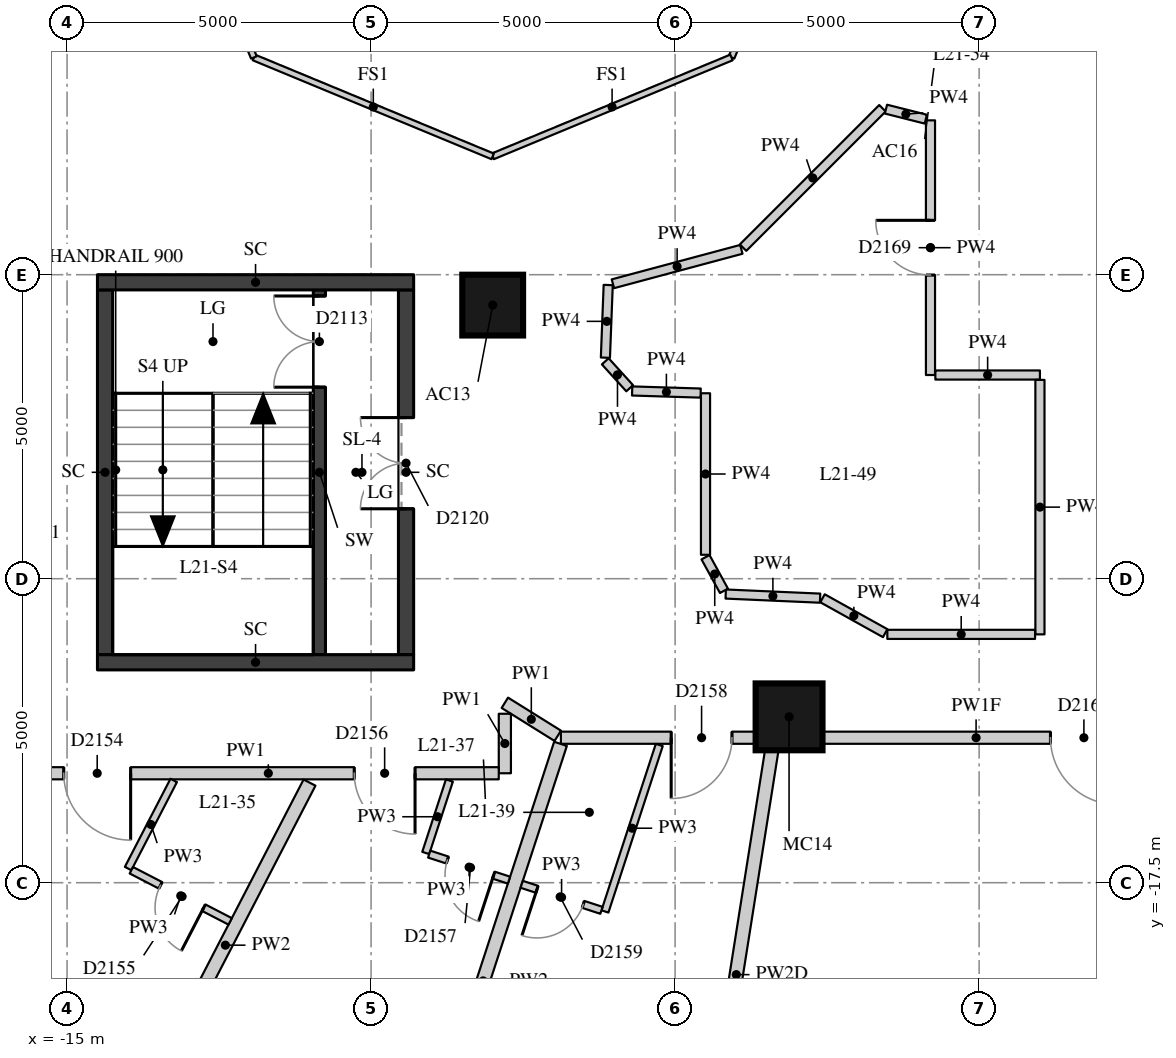
"""IFC4 building model, lengths in metres.
Left out: names, types, materials, properties, quantities, classifications, styles, units other than length and angle.
Written with IfcOpenShell. Run it as: python <this file> out.ifc"""

import sys

from ifc_helpers import new_model, si_unit, direction, frame, frame_2d, origin, origin_2d, place, context, subcontext, project, spatial, rectangle, extrude, element, fill, save


model = new_model("IFC4")
c1 = context("Model", 3, precision=1e-05, world=origin(), true_north=direction((0.0, 1.0)))
c2 = subcontext(c1, "Body", "Model", "MODEL_VIEW")
j1 = project(units=[si_unit("LENGTHUNIT", "METRE"), si_unit("PLANEANGLEUNIT", "RADIAN")], contexts=[c1])
p1 = place(None, origin())
s1 = spatial("IfcSite", under=j1, at=p1, CompositionType="ELEMENT")
p2 = place(p1, origin())
s2 = spatial("IfcBuilding", under=s1, at=p2, CompositionType="ELEMENT")
p3 = place(p2, frame((0.0, 0.0, 77.8)))
s3 = spatial("IfcBuildingStorey", under=s2, at=p3, CompositionType="ELEMENT", Elevation=77.8)
p4 = place(p3, frame((-8.0, -8.0, 0.0), z_axis=(0.0, 0.0, 1.0), x_axis=(1.0, 0.0, 0.0)))
e1 = element("IfcColumn", 1, at=p4, inside=s3, PredefinedType="COLUMN", context=c2, shape_type="SweptSolid", body=[
    extrude(rectangle(XDim=1.0, YDim=1.0, at=origin_2d()), origin(), (0.0, 0.0, 1.0), 3.3),
])
p5 = place(p3, frame((-3.126, -14.772, 0.0), z_axis=(0.0, 0.0, 1.0), x_axis=(1.0, 0.0, 0.0)))
e2 = element("IfcColumn", 2, at=p5, inside=s3, PredefinedType="COLUMN", context=c2, shape_type="SweptSolid", body=[
    extrude(rectangle(XDim=1.1, YDim=1.1, at=origin_2d()), origin(), (0.0, 0.0, 1.0), 3.3),
])
p6 = place(p3, frame((-10.85, -13.75, 0.0), z_axis=(0.0, 0.0, 1.0), x_axis=(0.0, 1.0, 0.0)))
e3 = element("IfcWall", 3, at=p6, inside=s3, PredefinedType="SHEAR", context=c2, shape_type="SweptSolid", body=[
    extrude(rectangle(XDim=6.0, YDim=0.2, at=frame_2d((3.0, 0.0))), origin(), (0.0, 0.0, 1.0), 3.02),
])
p7 = place(p6, frame((4.4, 0.0, 0.0)))
e4 = element("IfcOpeningElement", 4, at=p7, cuts=e3, PredefinedType="OPENING", context=c2, shape_type="SweptSolid", body=[
    extrude(rectangle(XDim=1.5, YDim=2.1, at=frame_2d((0.75, 1.05))), frame((0.0, 0.11, 0.0), z_axis=(0.0, -1.0, 0.0), x_axis=(1.0, 0.0, 0.0)), (0.0, 0.0, 1.0), 0.22),
])
p8 = place(p3, frame((-14.375, -13.75, -0.28), z_axis=(0.0, 0.0, 1.0), x_axis=(0.0, 1.0, 0.0)))
e5 = element("IfcWall", 5, at=p8, inside=s3, PredefinedType="SHEAR", context=c2, shape_type="SweptSolid", body=[
    extrude(rectangle(XDim=6.0, YDim=0.25, at=frame_2d((3.0, 0.0))), origin(), (0.0, 0.0, 1.0), 3.3),
])
p9 = place(p3, frame((-9.425, -13.75, -0.28), z_axis=(0.0, 0.0, 1.0), x_axis=(0.0, 1.0, 0.0)))
e6 = element("IfcWall", 6, at=p9, inside=s3, PredefinedType="SHEAR", context=c2, shape_type="SweptSolid", body=[
    extrude(rectangle(XDim=6.0, YDim=0.25, at=frame_2d((3.0, 0.0))), origin(), (0.0, 0.0, 1.0), 3.3),
])
p10 = place(p9, frame((2.4, 0.0, 0.28)))
e7 = element("IfcOpeningElement", 7, at=p10, cuts=e6, PredefinedType="OPENING", context=c2, shape_type="SweptSolid", body=[
    extrude(rectangle(XDim=1.5, YDim=2.1, at=frame_2d((0.75, 1.05))), frame((0.0, 0.135, 0.0), z_axis=(0.0, -1.0, 0.0), x_axis=(1.0, 0.0, 0.0)), (0.0, 0.0, 1.0), 0.27),
])
for number, where, z_axis, x_axis in (
    (8, (-14.5, -7.625, -0.28), (0.0, 0.0, 1.0), (1.0, 0.0, 0.0)),
    (9, (-14.5, -13.875, -0.28), (0.0, 0.0, 1.0), (1.0, 0.0, 0.0)),
):
    element("IfcWall", number, at=place(p3, frame(where, z_axis=z_axis, x_axis=x_axis)), inside=s3, PredefinedType="SHEAR", context=c2, shape_type="SweptSolid", body=[
        extrude(rectangle(XDim=5.2, YDim=0.25, at=frame_2d((2.6, 0.0))), origin(), (0.0, 0.0, 1.0), 3.3),
    ])
p11 = place(p3, frame((6.778, -15.115, 0.0), z_axis=(0.0, 0.0, 1.0), x_axis=(-1.0, 0.0, 0.0)))
e10 = element("IfcWall", 10, at=p11, inside=s3, PredefinedType="PARTITIONING", context=c2, shape_type="SweptSolid", body=[
    extrude(rectangle(XDim=13.657, YDim=0.2, at=frame_2d((6.828, 0.0))), origin(), (0.0, 0.0, 1.0), 2.42),
])
p12 = place(p11, frame((10.843, 0.0, 0.0)))
e11 = element("IfcOpeningElement", 11, at=p12, cuts=e10, PredefinedType="OPENING", context=c2, shape_type="SweptSolid", body=[
    extrude(rectangle(XDim=1.0, YDim=2.1, at=frame_2d((0.5, 1.05))), frame((0.0, 0.11, 0.0), z_axis=(0.0, -1.0, 0.0), x_axis=(1.0, 0.0, 0.0)), (0.0, 0.0, 1.0), 0.22),
])
p13 = place(p11, frame((4.505, 0.0, 0.0)))
e12 = element("IfcOpeningElement", 12, at=p13, cuts=e10, PredefinedType="OPENING", context=c2, shape_type="SweptSolid", body=[
    extrude(rectangle(XDim=1.1, YDim=2.1, at=frame_2d((0.55, 1.05))), frame((0.0, 0.11, 0.0), z_axis=(0.0, -1.0, 0.0), x_axis=(1.0, 0.0, 0.0)), (0.0, 0.0, 1.0), 0.22),
])
p14 = place(p3, frame((-6.93, -15.084, 0.0), z_axis=(0.0, 0.0, 1.0), x_axis=(-0.848439230109, 0.529292804421, 0.0)))
e13 = element("IfcWall", 13, at=p14, inside=s3, PredefinedType="PARTITIONING", context=c2, shape_type="SweptSolid", body=[
    extrude(rectangle(XDim=1.026, YDim=0.2, at=frame_2d((0.513, 0.0))), origin(), (0.0, 0.0, 1.0), 3.02),
])
p15 = place(p3, frame((-7.8, -14.721, 0.0), z_axis=(0.0, 0.0, 1.0), x_axis=(0.0, -1.0, 0.0)))
e14 = element("IfcWall", 14, at=p15, inside=s3, PredefinedType="PARTITIONING", context=c2, shape_type="SweptSolid", body=[
    extrude(rectangle(XDim=0.979, YDim=0.2, at=frame_2d((0.489, 0.0))), origin(), (0.0, 0.0, 1.0), 3.02),
])
p16 = place(p3, frame((-7.9, -15.7, 0.0), z_axis=(0.0, 0.0, 1.0), x_axis=(-1.0, 0.0, 0.0)))
e15 = element("IfcWall", 15, at=p16, inside=s3, PredefinedType="PARTITIONING", context=c2, shape_type="SweptSolid", body=[
    extrude(rectangle(XDim=7.58, YDim=0.2, at=frame_2d((3.79, 0.0))), origin(), (0.0, 0.0, 1.0), 3.02),
])
p17 = place(p16, frame((6.054, 0.0, 0.0)))
e16 = element("IfcOpeningElement", 16, at=p17, cuts=e15, PredefinedType="OPENING", context=c2, shape_type="SweptSolid", body=[
    extrude(rectangle(XDim=1.1, YDim=2.1, at=frame_2d((0.55, 1.05))), frame((0.0, 0.11, 0.0), z_axis=(0.0, -1.0, 0.0), x_axis=(1.0, 0.0, 0.0)), (0.0, 0.0, 1.0), 0.22),
])
p18 = place(p16, frame((1.377, 0.0, 0.0)))
e17 = element("IfcOpeningElement", 17, at=p18, cuts=e15, PredefinedType="OPENING", context=c2, shape_type="SweptSolid", body=[
    extrude(rectangle(XDim=1.0, YDim=2.1, at=frame_2d((0.5, 1.05))), frame((0.0, 0.11, 0.0), z_axis=(0.0, -1.0, 0.0), x_axis=(1.0, 0.0, 0.0)), (0.0, 0.0, 1.0), 0.22),
])
p19 = place(p3, frame((-0.8, -4.961, 0.0), z_axis=(0.0, 0.0, 1.0), x_axis=(0.0, -1.0, 0.0)))
e18 = element("IfcWall", 18, at=p19, inside=s3, PredefinedType="PARTITIONING", context=c2, shape_type="SweptSolid", body=[
    extrude(rectangle(XDim=4.188, YDim=0.15, at=frame_2d((2.094, 0.0))), origin(), (0.0, 0.0, 1.0), 3.02),
])
p20 = place(p19, frame((1.644, 0.0, 0.0)))
e19 = element("IfcOpeningElement", 19, at=p20, cuts=e18, PredefinedType="OPENING", context=c2, shape_type="SweptSolid", body=[
    extrude(rectangle(XDim=0.9, YDim=2.1, at=frame_2d((0.45, 1.05))), frame((0.0, 0.085, 0.0), z_axis=(0.0, -1.0, 0.0), x_axis=(1.0, 0.0, 0.0)), (0.0, 0.0, 1.0), 0.17),
])
p21 = place(p3, frame((-0.72, -9.15, 0.0), z_axis=(0.0, 0.0, 1.0), x_axis=(1.0, 0.0, 0.0)))
e20 = element("IfcWall", 20, at=p21, inside=s3, PredefinedType="PARTITIONING", context=c2, shape_type="SweptSolid", body=[
    extrude(rectangle(XDim=1.72, YDim=0.15, at=frame_2d((0.86, 0.0))), origin(), (0.0, 0.0, 1.0), 3.02),
])
p22 = place(p3, frame((1.0, -9.23, 0.0), z_axis=(0.0, 0.0, 1.0), x_axis=(0.0, -1.0, 0.0)))
e21 = element("IfcWall", 21, at=p22, inside=s3, PredefinedType="PARTITIONING", context=c2, shape_type="SweptSolid", body=[
    extrude(rectangle(XDim=4.186, YDim=0.15, at=frame_2d((2.093, 0.0))), origin(), (0.0, 0.0, 1.0), 3.02),
])
p23 = place(p3, frame((0.92, -13.416, 0.0), z_axis=(0.0, 0.0, 1.0), x_axis=(-1.0, 0.0, 0.0)))
e22 = element("IfcWall", 22, at=p23, inside=s3, PredefinedType="PARTITIONING", context=c2, shape_type="SweptSolid", body=[
    extrude(rectangle(XDim=2.43, YDim=0.15, at=frame_2d((1.215, 0.0))), origin(), (0.0, 0.0, 1.0), 3.02),
])
p24 = place(p3, frame((-1.545, -13.396, 0.0), z_axis=(0.0, 0.0, 1.0), x_axis=(-0.873678559566, 0.486503622345, 0.0)))
e23 = element("IfcWall", 23, at=p24, inside=s3, PredefinedType="PARTITIONING", context=c2, shape_type="SweptSolid", body=[
    extrude(rectangle(XDim=1.18, YDim=0.15, at=frame_2d((0.59, 0.0))), origin(), (0.0, 0.0, 1.0), 3.02),
])
p25 = place(p3, frame((-2.616, -12.82, 0.0), z_axis=(0.0, 0.0, 1.0), x_axis=(-0.99904515517, 0.04368956318, 0.0)))
e24 = element("IfcWall", 24, at=p25, inside=s3, PredefinedType="PARTITIONING", context=c2, shape_type="SweptSolid", body=[
    extrude(rectangle(XDim=1.553, YDim=0.15, at=frame_2d((0.777, 0.0))), origin(), (0.0, 0.0, 1.0), 3.02),
])
p26 = place(p3, frame((-4.196, -12.699, 0.0), z_axis=(0.0, 0.0, 1.0), x_axis=(-0.481398734925, 0.876501715921, 0.0)))
e25 = element("IfcWall", 25, at=p26, inside=s3, PredefinedType="PARTITIONING", context=c2, shape_type="SweptSolid", body=[
    extrude(rectangle(XDim=0.631, YDim=0.15, at=frame_2d((0.315, 0.0))), origin(), (0.0, 0.0, 1.0), 3.02),
])
p27 = place(p3, frame((-4.5, -12.106, 0.0), z_axis=(0.0, 0.0, 1.0), x_axis=(0.0, 1.0, 0.0)))
e26 = element("IfcWall", 26, at=p27, inside=s3, PredefinedType="PARTITIONING", context=c2, shape_type="SweptSolid", body=[
    extrude(rectangle(XDim=2.656, YDim=0.15, at=frame_2d((1.328, 0.0))), origin(), (0.0, 0.0, 1.0), 3.02),
])
p28 = place(p3, frame((-4.58, -9.447, 0.0), z_axis=(0.0, 0.0, 1.0), x_axis=(-0.999526758156, 0.030761334993, 0.0)))
e27 = element("IfcWall", 27, at=p28, inside=s3, PredefinedType="PARTITIONING", context=c2, shape_type="SweptSolid", body=[
    extrude(rectangle(XDim=1.127, YDim=0.15, at=frame_2d((0.563, 0.0))), origin(), (0.0, 0.0, 1.0), 3.02),
])
p29 = place(p3, frame((-5.747, -9.368, 0.0), z_axis=(0.0, 0.0, 1.0), x_axis=(-0.671757620202, 0.740771017049, 0.0)))
e28 = element("IfcWall", 28, at=p29, inside=s3, PredefinedType="PARTITIONING", context=c2, shape_type="SweptSolid", body=[
    extrude(rectangle(XDim=0.598, YDim=0.15, at=frame_2d((0.299, 0.0))), origin(), (0.0, 0.0, 1.0), 3.02),
])
p30 = place(p3, frame((-6.146, -8.865, 0.0), z_axis=(0.0, 0.0, 1.0), x_axis=(0.038582079081, 0.999255434398, 0.0)))
e29 = element("IfcWall", 29, at=p30, inside=s3, PredefinedType="PARTITIONING", context=c2, shape_type="SweptSolid", body=[
    extrude(rectangle(XDim=1.196, YDim=0.15, at=frame_2d((0.598, 0.0))), origin(), (0.0, 0.0, 1.0), 3.02),
])
p31 = place(p3, frame((-6.023, -7.649, 0.0), z_axis=(0.0, 0.0, 1.0), x_axis=(0.965906186456, 0.258892330836, 0.0)))
e30 = element("IfcWall", 30, at=p31, inside=s3, PredefinedType="PARTITIONING", context=c2, shape_type="SweptSolid", body=[
    extrude(rectangle(XDim=2.187, YDim=0.15, at=frame_2d((1.093, 0.0))), origin(), (0.0, 0.0, 1.0), 3.02),
])
p32 = place(p3, frame((-3.882, -7.055, 0.0), z_axis=(0.0, 0.0, 1.0), x_axis=(0.707069126061, 0.707144434307, 0.0)))
e31 = element("IfcWall", 31, at=p32, inside=s3, PredefinedType="PARTITIONING", context=c2, shape_type="SweptSolid", body=[
    extrude(rectangle(XDim=3.242, YDim=0.15, at=frame_2d((1.621, 0.0))), origin(), (0.0, 0.0, 1.0), 3.02),
])
p33 = place(p3, frame((-1.532, -4.777, 0.0), z_axis=(0.0, 0.0, 1.0), x_axis=(0.969694394352, -0.244321062461, 0.0)))
e32 = element("IfcWall", 32, at=p33, inside=s3, PredefinedType="PARTITIONING", context=c2, shape_type="SweptSolid", body=[
    extrude(rectangle(XDim=0.676, YDim=0.15, at=frame_2d((0.338, 0.0))), origin(), (0.0, 0.0, 1.0), 3.02),
])
p34 = place(p3, frame((-13.78, -21.201, 0.0), z_axis=(0.0, 0.0, 1.0), x_axis=(0.459689820266, 0.888079539875, 0.0)))
e33 = element("IfcWall", 33, at=p34, inside=s3, PredefinedType="PARTITIONING", context=c2, shape_type="SweptSolid", body=[
    extrude(rectangle(XDim=6.021, YDim=0.22, at=frame_2d((3.011, 0.0))), origin(), (0.0, 0.0, 1.0), 3.02),
])
p35 = place(p3, frame((-9.429, -23.014, 0.0), z_axis=(0.0, 0.0, 1.0), x_axis=(0.310248090606, 0.950655627594, 0.0)))
e34 = element("IfcWall", 34, at=p35, inside=s3, PredefinedType="PARTITIONING", context=c2, shape_type="SweptSolid", body=[
    extrude(rectangle(XDim=8.203, YDim=0.22, at=frame_2d((4.102, 0.0))), origin(), (0.0, 0.0, 1.0), 3.02),
])
p36 = place(p3, frame((-4.591, -22.789, 0.0), z_axis=(0.0, 0.0, 1.0), x_axis=(0.156151107863, 0.987733178299, 0.0)))
e35 = element("IfcWall", 35, at=p36, inside=s3, PredefinedType="PARTITIONING", context=c2, shape_type="SweptSolid", body=[
    extrude(rectangle(XDim=7.647, YDim=0.22, at=frame_2d((3.823, 0.0))), origin(), (0.0, 0.0, 1.0), 2.47),
])
p37 = place(p3, frame((-13.246, -15.818, 0.0), z_axis=(0.0, 0.0, 1.0), x_axis=(-0.459675202516, -0.888087106196, 0.0)))
e36 = element("IfcWall", 36, at=p37, inside=s3, PredefinedType="PARTITIONING", context=c2, shape_type="SweptSolid", body=[
    extrude(rectangle(XDim=1.632, YDim=0.12, at=frame_2d((0.816, 0.0))), origin(), (0.0, 0.0, 1.0), 3.02),
])
p38 = place(p3, frame((-8.712, -15.819, 0.0), z_axis=(0.0, 0.0, 1.0), x_axis=(-0.310322794195, -0.950631244702, 0.0)))
e37 = element("IfcWall", 37, at=p38, inside=s3, PredefinedType="PARTITIONING", context=c2, shape_type="SweptSolid", body=[
    extrude(rectangle(XDim=1.254, YDim=0.12, at=frame_2d((0.627, 0.0))), origin(), (0.0, 0.0, 1.0), 3.02),
])
p39 = place(p3, frame((-5.26, -15.235, 0.0), z_axis=(0.0, 0.0, 1.0), x_axis=(-0.310220453498, -0.950664646567, 0.0)))
e38 = element("IfcWall", 38, at=p39, inside=s3, PredefinedType="PARTITIONING", context=c2, shape_type="SweptSolid", body=[
    extrude(rectangle(XDim=2.88, YDim=0.12, at=frame_2d((1.44, 0.0))), origin(), (0.0, 0.0, 1.0), 3.02),
])
p40 = place(p3, frame((-13.943, -17.295, 0.0), z_axis=(0.0, 0.0, 1.0), x_axis=(0.888151937069, -0.459549928387, 0.0)))
e39 = element("IfcWall", 39, at=p40, inside=s3, PredefinedType="PARTITIONING", context=c2, shape_type="SweptSolid", body=[
    extrude(rectangle(XDim=1.83, YDim=0.12, at=frame_2d((0.915, 0.0))), origin(), (0.0, 0.0, 1.0), 3.02),
])
p41 = place(p40, frame((0.54, 0.0, 0.0)))
e40 = element("IfcOpeningElement", 40, at=p41, cuts=e39, PredefinedType="OPENING", context=c2, shape_type="SweptSolid", body=[
    extrude(rectangle(XDim=0.8, YDim=2.1, at=frame_2d((0.4, 1.05))), frame((0.0, 0.07, 0.0), z_axis=(0.0, -1.0, 0.0), x_axis=(1.0, 0.0, 0.0)), (0.0, 0.0, 1.0), 0.14),
])
p42 = place(p3, frame((-9.044, -17.03, 0.0), z_axis=(0.0, 0.0, 1.0), x_axis=(0.950645927723, -0.31027781117, 0.0)))
e41 = element("IfcWall", 41, at=p42, inside=s3, PredefinedType="PARTITIONING", context=c2, shape_type="SweptSolid", body=[
    extrude(rectangle(XDim=1.38, YDim=0.12, at=frame_2d((0.69, 0.0))), origin(), (0.0, 0.0, 1.0), 3.02),
])
p43 = place(p42, frame((0.315, 0.0, 0.0)))
e42 = element("IfcOpeningElement", 42, at=p43, cuts=e41, PredefinedType="OPENING", context=c2, shape_type="SweptSolid", body=[
    extrude(rectangle(XDim=0.8, YDim=2.1, at=frame_2d((0.4, 1.05))), frame((0.0, 0.07, 0.0), z_axis=(0.0, -1.0, 0.0), x_axis=(1.0, 0.0, 0.0)), (0.0, 0.0, 1.0), 0.14),
])
p44 = place(p3, frame((-6.211, -17.955, 0.0), z_axis=(0.0, 0.0, 1.0), x_axis=(-0.950645927723, 0.31027781117, 0.0)))
e43 = element("IfcWall", 43, at=p44, inside=s3, PredefinedType="PARTITIONING", context=c2, shape_type="SweptSolid", body=[
    extrude(rectangle(XDim=1.38, YDim=0.12, at=frame_2d((0.69, 0.0))), origin(), (0.0, 0.0, 1.0), 3.02),
])
p45 = place(p44, frame((0.315, 0.0, 0.0)))
e44 = element("IfcOpeningElement", 44, at=p45, cuts=e43, PredefinedType="OPENING", context=c2, shape_type="SweptSolid", body=[
    extrude(rectangle(XDim=0.8, YDim=2.1, at=frame_2d((0.4, 1.05))), frame((0.0, 0.07, 0.0), z_axis=(0.0, -1.0, 0.0), x_axis=(1.0, 0.0, 0.0)), (0.0, 0.0, 1.0), 0.14),
])
for number, where, z_axis, x_axis in (
    (45, (-2.446, 0.0, 0.0), (0.0, 0.0, 1.0), (-0.383, -0.924, 0.0)),
    (46, (-4.073, -3.927, 0.0), (0.0, 0.0, 1.0), (-0.924, -0.383, 0.0)),
    (47, (-8.0, -5.554, 0.0), (0.0, 0.0, 1.0), (-0.924, 0.383, 0.0)),
    (48, (-11.927, -3.927, 0.0), (0.0, 0.0, 1.0), (-0.383, 0.924, 0.0)),
):
    element("IfcWall", number, at=place(p3, frame(where, z_axis=z_axis, x_axis=x_axis)), inside=s3, PredefinedType="PARTITIONING", context=c2, shape_type="SweptSolid", body=[
        extrude(rectangle(XDim=4.251, YDim=0.1, at=frame_2d((2.125, 0.0))), origin(), (0.0, 0.0, 1.0), 3.02),
    ])
p46 = place(p7, origin())
e49 = element("IfcDoor", 49, at=p46, inside=s3, OperationType="DOUBLE_DOOR_SINGLE_SWING", PredefinedType="DOOR", context=c2, shape_type="SweptSolid", body=[
    extrude(rectangle(XDim=1.5, YDim=2.1, at=frame_2d((0.75, 1.05))), frame((0.0, 0.025, 0.0), z_axis=(0.0, -1.0, 0.0), x_axis=(1.0, 0.0, 0.0)), (0.0, 0.0, 1.0), 0.05),
])
fill(e4, e49)
p47 = place(p10, origin())
e50 = element("IfcDoor", 50, at=p47, inside=s3, OperationType="DOUBLE_DOOR_SINGLE_SWING", PredefinedType="DOOR", context=c2, shape_type="SweptSolid", body=[
    extrude(rectangle(XDim=1.5, YDim=2.1, at=frame_2d((0.75, 1.05))), frame((0.0, 0.025, 0.0), z_axis=(0.0, -1.0, 0.0), x_axis=(1.0, 0.0, 0.0)), (0.0, 0.0, 1.0), 0.05),
])
fill(e7, e50)
p48 = place(p17, origin())
e51 = element("IfcDoor", 51, at=p48, inside=s3, OperationType="SINGLE_SWING_LEFT", PredefinedType="DOOR", context=c2, shape_type="SweptSolid", body=[
    extrude(rectangle(XDim=1.1, YDim=2.1, at=frame_2d((0.55, 1.05))), frame((0.0, 0.025, 0.0), z_axis=(0.0, -1.0, 0.0), x_axis=(1.0, 0.0, 0.0)), (0.0, 0.0, 1.0), 0.05),
])
fill(e16, e51)
p49 = place(p41, origin())
e52 = element("IfcDoor", 52, at=p49, inside=s3, OperationType="SINGLE_SWING_LEFT", PredefinedType="DOOR", context=c2, shape_type="SweptSolid", body=[
    extrude(rectangle(XDim=0.8, YDim=2.1, at=frame_2d((0.4, 1.05))), frame((0.0, 0.025, 0.0), z_axis=(0.0, -1.0, 0.0), x_axis=(1.0, 0.0, 0.0)), (0.0, 0.0, 1.0), 0.05),
])
fill(e40, e52)
p50 = place(p18, origin())
e53 = element("IfcDoor", 53, at=p50, inside=s3, OperationType="SINGLE_SWING_LEFT", PredefinedType="DOOR", context=c2, shape_type="SweptSolid", body=[
    extrude(rectangle(XDim=1.0, YDim=2.1, at=frame_2d((0.5, 1.05))), frame((0.0, 0.025, 0.0), z_axis=(0.0, -1.0, 0.0), x_axis=(1.0, 0.0, 0.0)), (0.0, 0.0, 1.0), 0.05),
])
fill(e17, e53)
p51 = place(p43, origin())
e54 = element("IfcDoor", 54, at=p51, inside=s3, OperationType="SINGLE_SWING_LEFT", PredefinedType="DOOR", context=c2, shape_type="SweptSolid", body=[
    extrude(rectangle(XDim=0.8, YDim=2.1, at=frame_2d((0.4, 1.05))), frame((0.0, 0.025, 0.0), z_axis=(0.0, -1.0, 0.0), x_axis=(1.0, 0.0, 0.0)), (0.0, 0.0, 1.0), 0.05),
])
fill(e42, e54)
p52 = place(p12, origin())
e55 = element("IfcDoor", 55, at=p52, inside=s3, OperationType="SINGLE_SWING_RIGHT", PredefinedType="DOOR", context=c2, shape_type="SweptSolid", body=[
    extrude(rectangle(XDim=1.0, YDim=2.1, at=frame_2d((0.5, 1.05))), frame((0.0, 0.025, 0.0), z_axis=(0.0, -1.0, 0.0), x_axis=(1.0, 0.0, 0.0)), (0.0, 0.0, 1.0), 0.05),
])
fill(e11, e55)
p53 = place(p45, origin())
e56 = element("IfcDoor", 56, at=p53, inside=s3, OperationType="SINGLE_SWING_RIGHT", PredefinedType="DOOR", context=c2, shape_type="SweptSolid", body=[
    extrude(rectangle(XDim=0.8, YDim=2.1, at=frame_2d((0.4, 1.05))), frame((0.0, 0.025, 0.0), z_axis=(0.0, -1.0, 0.0), x_axis=(1.0, 0.0, 0.0)), (0.0, 0.0, 1.0), 0.05),
])
fill(e44, e56)
p54 = place(p13, origin())
e57 = element("IfcDoor", 57, at=p54, inside=s3, OperationType="SINGLE_SWING_LEFT", PredefinedType="DOOR", context=c2, shape_type="SweptSolid", body=[
    extrude(rectangle(XDim=1.1, YDim=2.1, at=frame_2d((0.55, 1.05))), frame((0.0, 0.025, 0.0), z_axis=(0.0, -1.0, 0.0), x_axis=(1.0, 0.0, 0.0)), (0.0, 0.0, 1.0), 0.05),
])
fill(e12, e57)
p55 = place(p20, origin())
e58 = element("IfcDoor", 58, at=p55, inside=s3, OperationType="SINGLE_SWING_RIGHT", PredefinedType="DOOR", context=c2, shape_type="SweptSolid", body=[
    extrude(rectangle(XDim=0.9, YDim=2.1, at=frame_2d((0.45, 1.05))), frame((0.0, 0.025, 0.0), z_axis=(0.0, -1.0, 0.0), x_axis=(1.0, 0.0, 0.0)), (0.0, 0.0, 1.0), 0.05),
])
fill(e19, e58)
save(model, sys.argv[1])
